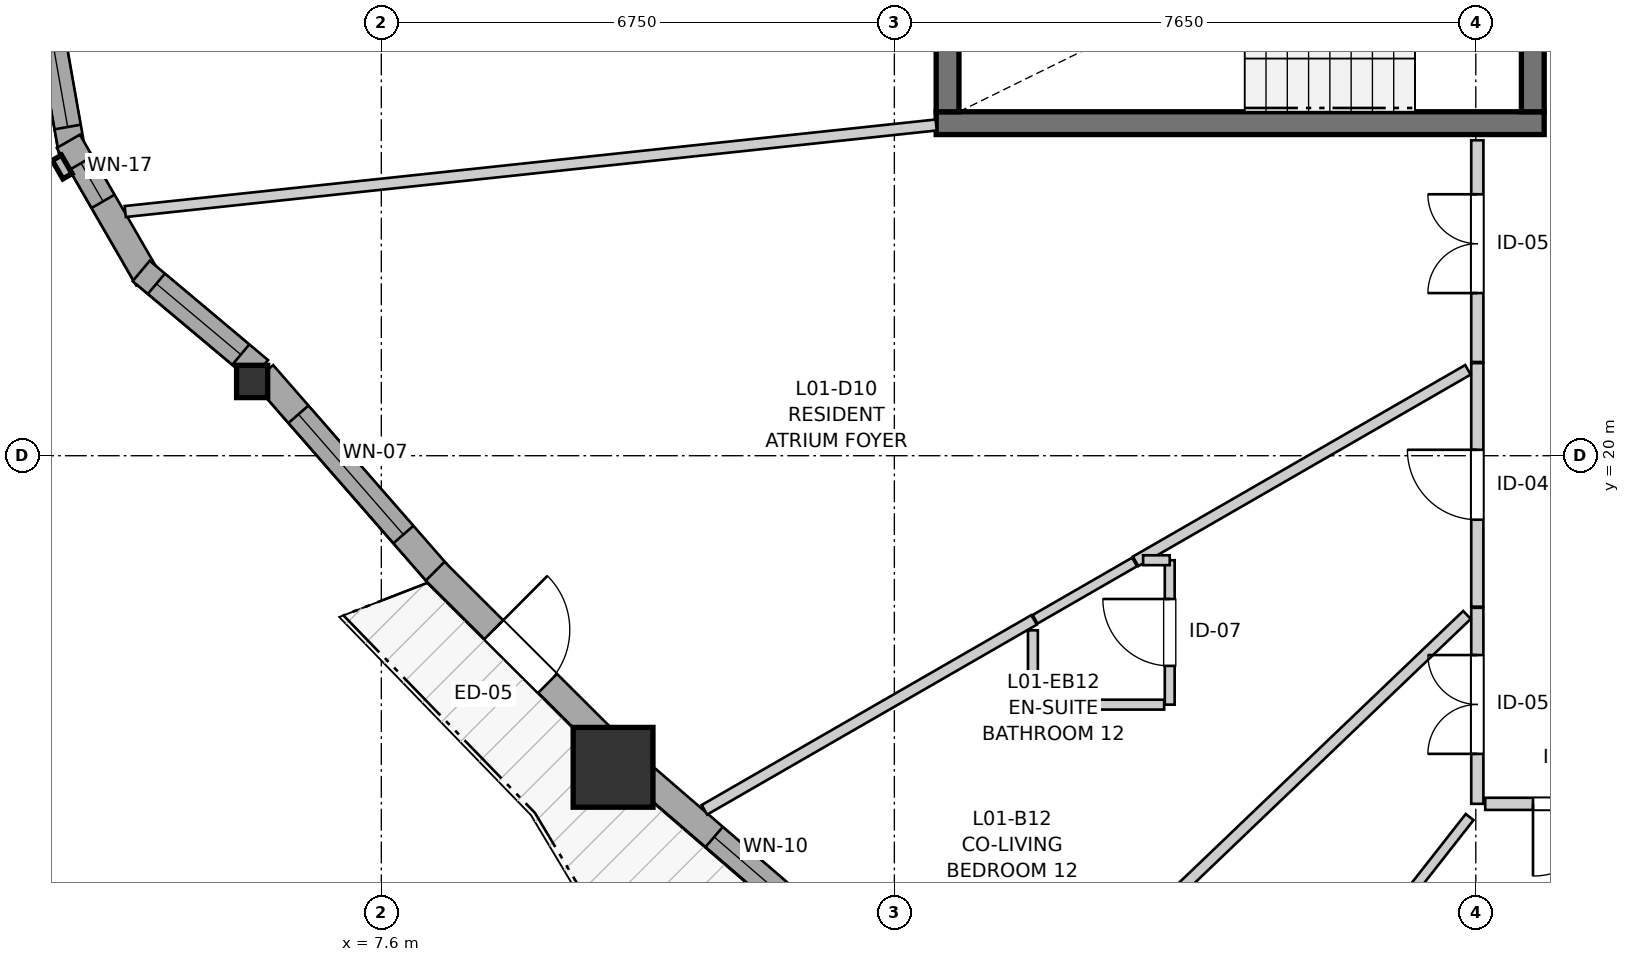
"""IFC4 building model, lengths in metres.
Left out: names, types, materials, properties, quantities, classifications, styles, units other than length and angle.
Written with IfcOpenShell. Run it as: python <this file> out.ifc"""

import sys

from ifc_helpers import new_model, si_unit, direction, frame, frame_2d, origin, origin_2d, place, context, subcontext, project, spatial, rectangle, i_section, extrude, source, transform, mapped, element, fill, save


model = new_model("IFC4")
c1 = context("Model", 3, precision=1e-05, world=origin(), true_north=direction((0.0, 1.0)))
c2 = subcontext(c1, "Body", "Model", "MODEL_VIEW")
j1 = project(units=[si_unit("LENGTHUNIT", "METRE"), si_unit("PLANEANGLEUNIT", "RADIAN")], contexts=[c1])
p1 = place(None, origin())
s1 = spatial("IfcSite", under=j1, at=p1, CompositionType="ELEMENT")
p2 = place(p1, origin())
s2 = spatial("IfcBuilding", under=s1, at=p2, CompositionType="ELEMENT")
p3 = place(p2, frame((0.0, 0.0, 7.8)))
s3 = spatial("IfcBuildingStorey", under=s2, at=p3, CompositionType="ELEMENT", Elevation=7.8)
p4 = place(p3, frame((14.9, 24.375, 0.0), z_axis=(0.0, 0.0, 1.0), x_axis=(1.0, 0.0, 0.0)))
e1 = element("IfcWall", 1, at=p4, inside=s3, PredefinedType="SHEAR", context=c2, shape_type="SweptSolid", body=[
    extrude(rectangle(XDim=8.0, YDim=0.3, at=frame_2d((4.0, 0.0))), origin(), (0.0, 0.0, 1.0), 2.94),
])
p5 = place(p3, frame((15.05, 27.475, 0.0), z_axis=(0.0, 0.0, 1.0), x_axis=(0.0, -1.0, 0.0)))
e2 = element("IfcWall", 2, at=p5, inside=s3, PredefinedType="SHEAR", context=c2, shape_type="SweptSolid", body=[
    extrude(rectangle(XDim=2.95, YDim=0.3, at=frame_2d((1.475, 0.0))), origin(), (0.0, 0.0, 1.0), 2.94),
])
p6 = place(p3, frame((22.75, 24.525, 0.0), z_axis=(0.0, 0.0, 1.0), x_axis=(0.0, 1.0, 0.0)))
e3 = element("IfcWall", 3, at=p6, inside=s3, PredefinedType="SHEAR", context=c2, shape_type="SweptSolid", body=[
    extrude(rectangle(XDim=2.95, YDim=0.3, at=frame_2d((1.475, 0.0))), origin(), (0.0, 0.0, 1.0), 2.94),
])
p7 = place(p6, frame((0.985, 0.0, 0.0)))
e4 = element("IfcOpeningElement", 4, at=p7, cuts=e3, PredefinedType="OPENING", context=c2, shape_type="SweptSolid", body=[
    extrude(rectangle(XDim=0.98, YDim=2.15, at=frame_2d((0.49, 1.075))), frame((0.0, 0.16, 0.0), z_axis=(0.0, -1.0, 0.0), x_axis=(1.0, 0.0, 0.0)), (0.0, 0.0, 1.0), 0.32),
])
m1 = source(origin(), c2, "Body", "SweptSolid", [
    extrude(i_section(OverallWidth=0.409, OverallDepth=0.425, WebThickness=0.03, FlangeThickness=0.048, FilletRadius=0.015, at=origin_2d()), origin(), (0.0, 0.0, 1.0), 2.94),
])
p8 = place(p3, frame((5.9, 20.977, 0.0), z_axis=(0.0, 0.0, 1.0), x_axis=(1.0, 0.0, 0.0)))
e5 = element("IfcColumn", 5, at=p8, inside=s3, PredefinedType="PILASTER", context=c2, shape_type="MappedRepresentation", body=[
    mapped(m1, transform((0.0, 0.0, 0.0), x_axis=(1.0, 0.0, 0.0), y_axis=(0.0, 1.0, 0.0), z_axis=(0.0, 0.0, 1.0), scale=1.0)),
])
m2 = source(origin(), c2, "Body", "SweptSolid", [
    extrude(rectangle(XDim=1.05, YDim=1.05, at=origin_2d()), origin(), (0.0, 0.0, 1.0), 2.94),
])
p9 = place(p3, frame((10.649, 15.9, 0.0), z_axis=(0.0, 0.0, 1.0), x_axis=(1.0, 0.0, 0.0)))
e6 = element("IfcColumn", 6, at=p9, inside=s3, PredefinedType="COLUMN", context=c2, shape_type="MappedRepresentation", body=[
    mapped(m2, transform((0.0, 0.0, 0.0), x_axis=(1.0, 0.0, 0.0), y_axis=(0.0, 1.0, 0.0), z_axis=(0.0, 0.0, 1.0), scale=1.0)),
])
p10 = place(p3, frame((3.166, 26.068, 0.0), z_axis=(0.0, 0.0, 1.0), x_axis=(0.173672066494, -0.984803540469, 0.0)))
e7 = element("IfcWall", 7, at=p10, inside=s3, PredefinedType="SOLIDWALL", context=c2, shape_type="SweptSolid", body=[
    extrude(rectangle(XDim=2.09, YDim=0.35, at=frame_2d((1.045, 0.0))), origin(), (0.0, 0.0, 1.0), 2.42),
])
p11 = place(p10, frame((0.32, 0.0, 0.82)))
e8 = element("IfcOpeningElement", 8, at=p11, cuts=e7, PredefinedType="OPENING", context=c2, shape_type="SweptSolid", body=[
    extrude(rectangle(XDim=1.45, YDim=1.25, at=frame_2d((0.725, 0.625))), frame((0.0, 0.185, 0.0), z_axis=(0.0, -1.0, 0.0), x_axis=(1.0, 0.0, 0.0)), (0.0, 0.0, 1.0), 0.37),
])
p12 = place(p3, frame((3.482, 24.137, 0.0), z_axis=(0.0, 0.0, 1.0), x_axis=(0.499995423472, -0.866028046028, 0.0)))
e9 = element("IfcWall", 9, at=p12, inside=s3, PredefinedType="SOLIDWALL", context=c2, shape_type="SweptSolid", body=[
    extrude(rectangle(XDim=2.09, YDim=0.35, at=frame_2d((1.045, 0.0))), origin(), (0.0, 0.0, 1.0), 2.42),
])
p13 = place(p12, frame((0.333, 0.0, 0.82)))
e10 = element("IfcOpeningElement", 10, at=p13, cuts=e9, PredefinedType="OPENING", context=c2, shape_type="SweptSolid", body=[
    extrude(rectangle(XDim=0.58, YDim=1.35, at=frame_2d((0.29, 0.675))), frame((0.0, 0.185, 0.0), z_axis=(0.0, -1.0, 0.0), x_axis=(1.0, 0.0, 0.0)), (0.0, 0.0, 1.0), 0.37),
])
p14 = place(p3, frame((4.44, 22.43, 0.0), z_axis=(0.0, 0.0, 1.0), x_axis=(0.766090423188, -0.642732808793, 0.0)))
e11 = element("IfcWall", 11, at=p14, inside=s3, PredefinedType="SOLIDWALL", context=c2, shape_type="SweptSolid", body=[
    extrude(rectangle(XDim=2.032, YDim=0.35, at=frame_2d((1.016, 0.0))), origin(), (0.0, 0.0, 1.0), 2.42),
])
p15 = place(p14, frame((0.261, 0.0, 0.82)))
e12 = element("IfcOpeningElement", 12, at=p15, cuts=e11, PredefinedType="OPENING", context=c2, shape_type="SweptSolid", body=[
    extrude(rectangle(XDim=1.45, YDim=1.25, at=frame_2d((0.725, 0.625))), frame((0.0, 0.185, 0.0), z_axis=(0.0, -1.0, 0.0), x_axis=(1.0, 0.0, 0.0)), (0.0, 0.0, 1.0), 0.37),
])
p16 = place(p3, frame((6.045, 21.077, 0.0), z_axis=(0.0, 0.0, 1.0), x_axis=(0.657628390725, -0.753342485004, 0.0)))
e13 = element("IfcWall", 13, at=p16, inside=s3, PredefinedType="SOLIDWALL", context=c2, shape_type="SweptSolid", body=[
    extrude(rectangle(XDim=3.533, YDim=0.35, at=frame_2d((1.766, 0.0))), origin(), (0.0, 0.0, 1.0), 2.42),
])
p17 = place(p16, frame((0.706, 0.0, 0.82)))
e14 = element("IfcOpeningElement", 14, at=p17, cuts=e13, PredefinedType="OPENING", context=c2, shape_type="SweptSolid", body=[
    extrude(rectangle(XDim=2.1, YDim=1.4, at=frame_2d((1.05, 0.7))), frame((0.0, 0.185, 0.0), z_axis=(0.0, -1.0, 0.0), x_axis=(1.0, 0.0, 0.0)), (0.0, 0.0, 1.0), 0.37),
])
p18 = place(p3, frame((8.308, 18.48, 0.0), z_axis=(0.0, 0.0, 1.0), x_axis=(0.708411049028, -0.705800103156, 0.0)))
e15 = element("IfcWall", 15, at=p18, inside=s3, PredefinedType="SOLIDWALL", context=c2, shape_type="SweptSolid", body=[
    extrude(rectangle(XDim=3.179, YDim=0.35, at=frame_2d((1.59, 0.0))), origin(), (0.0, 0.0, 1.0), 2.42),
])
p19 = place(p18, frame((1.09, 0.0, 0.0)))
e16 = element("IfcOpeningElement", 16, at=p19, cuts=e15, PredefinedType="OPENING", context=c2, shape_type="SweptSolid", body=[
    extrude(rectangle(XDim=1.0, YDim=2.1, at=frame_2d((0.5, 1.05))), frame((0.0, 0.185, 0.0), z_axis=(0.0, -1.0, 0.0), x_axis=(1.0, 0.0, 0.0)), (0.0, 0.0, 1.0), 0.37),
])
p20 = place(p3, frame((10.99, 15.837, 0.0), z_axis=(0.0, 0.0, 1.0), x_axis=(0.757465946779, -0.652874673632, 0.0)))
e17 = element("IfcWall", 17, at=p20, inside=s3, PredefinedType="SOLIDWALL", context=c2, shape_type="SweptSolid", body=[
    extrude(rectangle(XDim=3.123, YDim=0.35, at=frame_2d((1.562, 0.0))), origin(), (0.0, 0.0, 1.0), 2.42),
])
p21 = place(p20, frame((1.305, 0.0, 0.82)))
e18 = element("IfcOpeningElement", 18, at=p21, cuts=e17, PredefinedType="OPENING", context=c2, shape_type="SweptSolid", body=[
    extrude(rectangle(XDim=1.4, YDim=1.35, at=frame_2d((0.7, 0.675))), frame((0.0, 0.185, 0.0), z_axis=(0.0, -1.0, 0.0), x_axis=(1.0, 0.0, 0.0)), (0.0, 0.0, 1.0), 0.37),
])
p22 = place(p3, frame((22.02, 18.014, 0.0), z_axis=(0.0, 0.0, 1.0), x_axis=(0.0, 1.0, 0.0)))
e19 = element("IfcWall", 19, at=p22, inside=s3, PredefinedType="PARTITIONING", context=c2, shape_type="SweptSolid", body=[
    extrude(rectangle(XDim=3.204, YDim=0.16, at=frame_2d((1.602, 0.0))), origin(), (0.0, 0.0, 1.0), 2.94),
])
p23 = place(p22, frame((1.144, 0.0, 0.0)))
e20 = element("IfcOpeningElement", 20, at=p23, cuts=e19, PredefinedType="OPENING", context=c2, shape_type="SweptSolid", body=[
    extrude(rectangle(XDim=0.92, YDim=2.1, at=frame_2d((0.46, 1.05))), frame((0.0, 0.09, 0.0), z_axis=(0.0, -1.0, 0.0), x_axis=(1.0, 0.0, 0.0)), (0.0, 0.0, 1.0), 0.18),
])
p24 = place(p3, frame((22.02, 21.233, 0.0), z_axis=(0.0, 0.0, 1.0), x_axis=(0.0, 1.0, 0.0)))
e21 = element("IfcWall", 21, at=p24, inside=s3, PredefinedType="PARTITIONING", context=c2, shape_type="SweptSolid", body=[
    extrude(rectangle(XDim=2.917, YDim=0.16, at=frame_2d((1.458, 0.0))), origin(), (0.0, 0.0, 1.0), 2.94),
])
p25 = place(p24, frame((0.906, 0.0, 0.0)))
e22 = element("IfcOpeningElement", 22, at=p25, cuts=e21, PredefinedType="OPENING", context=c2, shape_type="SweptSolid", body=[
    extrude(rectangle(XDim=1.3, YDim=2.1, at=frame_2d((0.65, 1.05))), frame((0.0, 0.09, 0.0), z_axis=(0.0, -1.0, 0.0), x_axis=(1.0, 0.0, 0.0)), (0.0, 0.0, 1.0), 0.18),
])
p26 = place(p3, frame((22.02, 15.42, 0.0), z_axis=(0.0, 0.0, 1.0), x_axis=(0.0, 1.0, 0.0)))
e23 = element("IfcWall", 23, at=p26, inside=s3, PredefinedType="PARTITIONING", context=c2, shape_type="SweptSolid", body=[
    extrude(rectangle(XDim=2.579, YDim=0.16, at=frame_2d((1.29, 0.0))), origin(), (0.0, 0.0, 1.0), 2.94),
])
p27 = place(p26, frame((0.657, 0.0, 0.0)))
e24 = element("IfcOpeningElement", 24, at=p27, cuts=e23, PredefinedType="OPENING", context=c2, shape_type="SweptSolid", body=[
    extrude(rectangle(XDim=1.3, YDim=2.1, at=frame_2d((0.65, 1.05))), frame((0.0, 0.09, 0.0), z_axis=(0.0, -1.0, 0.0), x_axis=(1.0, 0.0, 0.0)), (0.0, 0.0, 1.0), 0.18),
])
p28 = place(p3, frame((24.368, 15.42, 0.0), z_axis=(0.0, 0.0, 1.0), x_axis=(-1.0, 0.0, 0.0)))
e25 = element("IfcWall", 25, at=p28, inside=s3, PredefinedType="PARTITIONING", context=c2, shape_type="SweptSolid", body=[
    extrude(rectangle(XDim=2.244, YDim=0.16, at=frame_2d((1.122, 0.0))), origin(), (0.0, 0.0, 1.0), 2.94),
])
p29 = place(p28, frame((0.666, 0.0, 0.0)))
e26 = element("IfcOpeningElement", 26, at=p29, cuts=e25, PredefinedType="OPENING", context=c2, shape_type="SweptSolid", body=[
    extrude(rectangle(XDim=0.95, YDim=2.1, at=frame_2d((0.475, 1.05))), frame((0.0, 0.09, 0.0), z_axis=(0.0, -1.0, 0.0), x_axis=(1.0, 0.0, 0.0)), (0.0, 0.0, 1.0), 0.18),
])
p30 = place(p3, frame((17.973, 16.725, 0.0), z_axis=(0.0, 0.0, 1.0), x_axis=(0.0, 1.0, 0.0)))
e27 = element("IfcWall", 27, at=p30, inside=s3, PredefinedType="PARTITIONING", context=c2, shape_type="SweptSolid", body=[
    extrude(rectangle(XDim=1.9, YDim=0.13, at=frame_2d((0.95, 0.0))), origin(), (0.0, 0.0, 1.0), 2.94),
])
p31 = place(p30, frame((0.51, 0.0, 0.0)))
e28 = element("IfcOpeningElement", 28, at=p31, cuts=e27, PredefinedType="OPENING", context=c2, shape_type="SweptSolid", body=[
    extrude(rectangle(XDim=0.88, YDim=2.05, at=frame_2d((0.44, 1.025))), frame((0.0, 0.075, 0.0), z_axis=(0.0, -1.0, 0.0), x_axis=(1.0, 0.0, 0.0)), (0.0, 0.0, 1.0), 0.15),
])
p32 = place(p3, frame((4.231, 23.212, 0.0), z_axis=(0.0, 0.0, 1.0), x_axis=(0.994353055544, 0.106122575023, 0.0)))
e29 = element("IfcWall", 29, at=p32, inside=s3, PredefinedType="PARTITIONING", context=c2, shape_type="SweptSolid", body=[
    extrude(rectangle(XDim=10.73, YDim=0.145, at=frame_2d((5.365, 0.0))), origin(), (0.0, 0.0, 1.0), 2.94),
])
p33 = place(p3, frame((15.888, 12.171, 0.0), z_axis=(0.0, 0.0, 1.0), x_axis=(0.722733244608, 0.691127091886, 0.0)))
e30 = element("IfcWall", 30, at=p33, inside=s3, PredefinedType="PARTITIONING", context=c2, shape_type="SweptSolid", body=[
    extrude(rectangle(XDim=8.296, YDim=0.145, at=frame_2d((4.148, 0.0))), origin(), (0.0, 0.0, 1.0), 2.94),
])
p34 = place(p3, frame((18.296, 10.625, 0.0), z_axis=(0.0, 0.0, 1.0), x_axis=(0.616906721473, 0.787036274261, 0.0)))
e31 = element("IfcWall", 31, at=p34, inside=s3, PredefinedType="PARTITIONING", context=c2, shape_type="SweptSolid", body=[
    extrude(rectangle(XDim=5.872, YDim=0.13, at=frame_2d((2.936, 0.0))), origin(), (0.0, 0.0, 1.0), 2.94),
])
p35 = place(p3, frame((17.524, 18.61, 0.0), z_axis=(0.0, 0.0, 1.0), x_axis=(0.866454437228, 0.499256154903, 0.0)))
e32 = element("IfcWall", 32, at=p35, inside=s3, PredefinedType="PARTITIONING", context=c2, shape_type="SweptSolid", body=[
    extrude(rectangle(XDim=5.047, YDim=0.145, at=frame_2d((2.523, 0.0))), origin(), (0.0, 0.0, 1.0), 2.94),
])
p36 = place(p3, frame((11.851, 15.342, 0.0), z_axis=(0.0, 0.0, 1.0), x_axis=(0.86649075999, 0.499193111784, 0.0)))
e33 = element("IfcWall", 33, at=p36, inside=s3, PredefinedType="PARTITIONING", context=c2, shape_type="SweptSolid", body=[
    extrude(rectangle(XDim=5.005, YDim=0.145, at=frame_2d((2.502, 0.0))), origin(), (0.0, 0.0, 1.0), 2.94),
])
p37 = place(p3, frame((16.173, 16.725, 0.0), z_axis=(0.0, 0.0, 1.0), x_axis=(1.0, 0.0, 0.0)))
e34 = element("IfcWall", 34, at=p37, inside=s3, PredefinedType="PARTITIONING", context=c2, shape_type="SweptSolid", body=[
    extrude(rectangle(XDim=1.727, YDim=0.13, at=frame_2d((0.863, 0.0))), origin(), (0.0, 0.0, 1.0), 2.94),
])
p38 = place(p3, frame((16.201, 17.848, 0.0), z_axis=(0.0, 0.0, 1.0), x_axis=(0.866448907576, 0.49926575144, 0.0)))
e35 = element("IfcWall", 35, at=p38, inside=s3, PredefinedType="PARTITIONING", context=c2, shape_type="SweptSolid", body=[
    extrude(rectangle(XDim=1.512, YDim=0.13, at=frame_2d((0.756, 0.0))), origin(), (0.0, 0.0, 1.0), 2.94),
])
p39 = place(p3, frame((16.173, 16.798, 0.0), z_axis=(0.0, 0.0, 1.0), x_axis=(0.0, 1.0, 0.0)))
e36 = element("IfcWall", 36, at=p39, inside=s3, PredefinedType="PARTITIONING", context=c2, shape_type="SweptSolid", body=[
    extrude(rectangle(XDim=0.905, YDim=0.13, at=frame_2d((0.452, 0.0))), origin(), (0.0, 0.0, 1.0), 2.94),
])
p40 = place(p3, frame((17.623, 18.625, 0.0), z_axis=(0.0, 0.0, 1.0), x_axis=(1.0, 0.0, 0.0)))
e37 = element("IfcWall", 37, at=p40, inside=s3, PredefinedType="PARTITIONING", context=c2, shape_type="SweptSolid", body=[
    extrude(rectangle(XDim=0.35, YDim=0.13, at=frame_2d((0.175, 0.0))), origin(), (0.0, 0.0, 1.0), 2.94),
])
m3 = source(origin(), c2, "Body", "SweptSolid", [
    extrude(rectangle(XDim=1.45, YDim=1.25, at=frame_2d((0.725, 0.625))), frame((0.0, 0.03, 0.0), z_axis=(0.0, -1.0, 0.0), x_axis=(1.0, 0.0, 0.0)), (0.0, 0.0, 1.0), 0.06),
])
p41 = place(p11, origin())
e38 = element("IfcWindow", 38, at=p41, inside=s3, PartitioningType="SINGLE_PANEL", PredefinedType="WINDOW", context=c2, shape_type="MappedRepresentation", body=[
    mapped(m3, transform((0.0, 0.0, 0.0), x_axis=(1.0, 0.0, 0.0), y_axis=(0.0, 1.0, 0.0), z_axis=(0.0, 0.0, 1.0), scale=1.0)),
])
fill(e8, e38)
m4 = source(origin(), c2, "Body", "SweptSolid", [
    extrude(rectangle(XDim=0.58, YDim=1.35, at=frame_2d((0.29, 0.675))), frame((0.0, 0.03, 0.0), z_axis=(0.0, -1.0, 0.0), x_axis=(1.0, 0.0, 0.0)), (0.0, 0.0, 1.0), 0.06),
])
p42 = place(p13, origin())
e39 = element("IfcWindow", 39, at=p42, inside=s3, PartitioningType="SINGLE_PANEL", PredefinedType="WINDOW", context=c2, shape_type="MappedRepresentation", body=[
    mapped(m4, transform((0.0, 0.0, 0.0), x_axis=(1.0, 0.0, 0.0), y_axis=(0.0, 1.0, 0.0), z_axis=(0.0, 0.0, 1.0), scale=1.0)),
])
fill(e10, e39)
p43 = place(p15, origin())
e40 = element("IfcWindow", 40, at=p43, inside=s3, PartitioningType="SINGLE_PANEL", PredefinedType="WINDOW", context=c2, shape_type="MappedRepresentation", body=[
    mapped(m3, transform((0.0, 0.0, 0.0), x_axis=(1.0, 0.0, 0.0), y_axis=(0.0, 1.0, 0.0), z_axis=(0.0, 0.0, 1.0), scale=1.0)),
])
fill(e12, e40)
m5 = source(origin(), c2, "Body", "SweptSolid", [
    extrude(rectangle(XDim=2.1, YDim=1.4, at=frame_2d((1.05, 0.7))), frame((0.0, 0.03, 0.0), z_axis=(0.0, -1.0, 0.0), x_axis=(1.0, 0.0, 0.0)), (0.0, 0.0, 1.0), 0.06),
])
p44 = place(p17, origin())
e41 = element("IfcWindow", 41, at=p44, inside=s3, PartitioningType="SINGLE_PANEL", PredefinedType="WINDOW", context=c2, shape_type="MappedRepresentation", body=[
    mapped(m5, transform((0.0, 0.0, 0.0), x_axis=(1.0, 0.0, 0.0), y_axis=(0.0, 1.0, 0.0), z_axis=(0.0, 0.0, 1.0), scale=1.0)),
])
fill(e14, e41)
m6 = source(origin(), c2, "Body", "SweptSolid", [
    extrude(rectangle(XDim=1.4, YDim=1.35, at=frame_2d((0.7, 0.675))), frame((0.0, 0.03, 0.0), z_axis=(0.0, -1.0, 0.0), x_axis=(1.0, 0.0, 0.0)), (0.0, 0.0, 1.0), 0.06),
])
p45 = place(p21, origin())
e42 = element("IfcWindow", 42, at=p45, inside=s3, PartitioningType="SINGLE_PANEL", PredefinedType="WINDOW", context=c2, shape_type="MappedRepresentation", body=[
    mapped(m6, transform((0.0, 0.0, 0.0), x_axis=(1.0, 0.0, 0.0), y_axis=(0.0, 1.0, 0.0), z_axis=(0.0, 0.0, 1.0), scale=1.0)),
])
fill(e18, e42)
m7 = source(origin(), c2, "Body", "SweptSolid", [
    extrude(rectangle(XDim=1.0, YDim=2.1, at=frame_2d((0.5, 1.05))), frame((0.0, 0.025, 0.0), z_axis=(0.0, -1.0, 0.0), x_axis=(1.0, 0.0, 0.0)), (0.0, 0.0, 1.0), 0.05),
])
p46 = place(p19, origin())
e43 = element("IfcDoor", 43, at=p46, inside=s3, OperationType="SINGLE_SWING_LEFT", PredefinedType="DOOR", context=c2, shape_type="MappedRepresentation", body=[
    mapped(m7, transform((0.0, 0.0, 0.0), x_axis=(1.0, 0.0, 0.0), y_axis=(0.0, 1.0, 0.0), z_axis=(0.0, 0.0, 1.0), scale=1.0)),
])
fill(e16, e43)
m8 = source(origin(), c2, "Body", "SweptSolid", [
    extrude(rectangle(XDim=0.92, YDim=2.1, at=frame_2d((0.46, 1.05))), frame((0.0, 0.025, 0.0), z_axis=(0.0, -1.0, 0.0), x_axis=(1.0, 0.0, 0.0)), (0.0, 0.0, 1.0), 0.05),
])
p47 = place(p23, origin())
e44 = element("IfcDoor", 44, at=p47, inside=s3, OperationType="SINGLE_SWING_RIGHT", PredefinedType="DOOR", context=c2, shape_type="MappedRepresentation", body=[
    mapped(m8, transform((0.0, 0.0, 0.0), x_axis=(1.0, 0.0, 0.0), y_axis=(0.0, 1.0, 0.0), z_axis=(0.0, 0.0, 1.0), scale=1.0)),
])
fill(e20, e44)
m9 = source(origin(), c2, "Body", "SweptSolid", [
    extrude(rectangle(XDim=1.3, YDim=2.1, at=frame_2d((0.65, 1.05))), frame((0.0, 0.025, 0.0), z_axis=(0.0, -1.0, 0.0), x_axis=(1.0, 0.0, 0.0)), (0.0, 0.0, 1.0), 0.05),
])
p48 = place(p25, origin())
e45 = element("IfcDoor", 45, at=p48, inside=s3, OperationType="DOUBLE_DOOR_SINGLE_SWING", PredefinedType="DOOR", context=c2, shape_type="MappedRepresentation", body=[
    mapped(m9, transform((0.0, 0.0, 0.0), x_axis=(1.0, 0.0, 0.0), y_axis=(0.0, 1.0, 0.0), z_axis=(0.0, 0.0, 1.0), scale=1.0)),
])
fill(e22, e45)
p49 = place(p27, origin())
e46 = element("IfcDoor", 46, at=p49, inside=s3, OperationType="DOUBLE_DOOR_SINGLE_SWING", PredefinedType="DOOR", context=c2, shape_type="MappedRepresentation", body=[
    mapped(m9, transform((0.0, 0.0, 0.0), x_axis=(1.0, 0.0, 0.0), y_axis=(0.0, 1.0, 0.0), z_axis=(0.0, 0.0, 1.0), scale=1.0)),
])
fill(e24, e46)
m10 = source(origin(), c2, "Body", "SweptSolid", [
    extrude(rectangle(XDim=0.95, YDim=2.1, at=frame_2d((0.475, 1.05))), frame((0.0, 0.025, 0.0), z_axis=(0.0, -1.0, 0.0), x_axis=(1.0, 0.0, 0.0)), (0.0, 0.0, 1.0), 0.05),
])
p50 = place(p29, origin())
e47 = element("IfcDoor", 47, at=p50, inside=s3, OperationType="SINGLE_SWING_RIGHT", PredefinedType="DOOR", context=c2, shape_type="MappedRepresentation", body=[
    mapped(m10, transform((0.0, 0.0, 0.0), x_axis=(1.0, 0.0, 0.0), y_axis=(0.0, 1.0, 0.0), z_axis=(0.0, 0.0, 1.0), scale=1.0)),
])
fill(e26, e47)
m11 = source(origin(), c2, "Body", "SweptSolid", [
    extrude(rectangle(XDim=0.88, YDim=2.05, at=frame_2d((0.44, 1.025))), frame((0.0, 0.025, 0.0), z_axis=(0.0, -1.0, 0.0), x_axis=(1.0, 0.0, 0.0)), (0.0, 0.0, 1.0), 0.05),
])
p51 = place(p31, origin())
e48 = element("IfcDoor", 48, at=p51, inside=s3, OperationType="SINGLE_SWING_RIGHT", PredefinedType="DOOR", context=c2, shape_type="MappedRepresentation", body=[
    mapped(m11, transform((0.0, 0.0, 0.0), x_axis=(1.0, 0.0, 0.0), y_axis=(0.0, 1.0, 0.0), z_axis=(0.0, 0.0, 1.0), scale=1.0)),
])
fill(e28, e48)
save(model, sys.argv[1])
